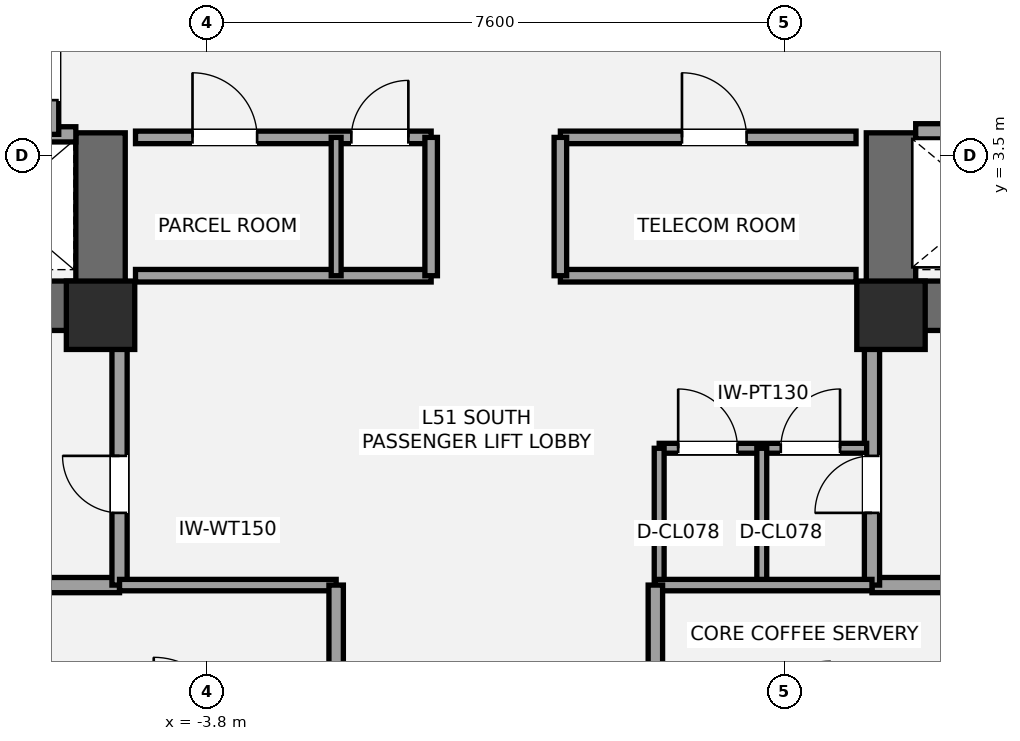
"""IFC4 building model, lengths in metres.
Left out: names, types, materials, properties, quantities, classifications, styles, units other than length and angle.
Written with IfcOpenShell. Run it as: python <this file> out.ifc"""

import sys

from ifc_helpers import new_model, si_unit, direction, frame, frame_2d, origin, origin_2d, place, context, subcontext, project, spatial, rectangle, extrude, element, fill, save


model = new_model("IFC4")
c1 = context("Model", 3, precision=1e-05, world=origin(), true_north=direction((0.0, 1.0)))
c2 = subcontext(c1, "Body", "Model", "MODEL_VIEW")
j1 = project(units=[si_unit("LENGTHUNIT", "METRE"), si_unit("PLANEANGLEUNIT", "RADIAN")], contexts=[c1])
p1 = place(None, origin())
s1 = spatial("IfcSite", under=j1, at=p1, CompositionType="ELEMENT")
p2 = place(p1, origin())
s2 = spatial("IfcBuilding", under=s1, at=p2, CompositionType="ELEMENT")
p3 = place(p2, frame((0.0, 0.0, 185.4)))
s3 = spatial("IfcBuildingStorey", under=s2, at=p3, CompositionType="ELEMENT", Elevation=185.4)
p4 = place(p3, frame((-4.875, 1.525, 0.0), z_axis=(0.0, 0.0, 1.0), x_axis=(-1.0, 0.0, 0.0)))
e1 = element("IfcWall", 1, at=p4, inside=s3, PredefinedType="SHEAR", context=c2, shape_type="SweptSolid", body=[
    extrude(rectangle(XDim=8.925, YDim=0.65, at=frame_2d((4.462, 0.0))), origin(), (0.0, 0.0, 1.0), 3.2),
])
p5 = place(p4, frame((5.425, 0.0, 0.0)))
e2 = element("IfcOpeningElement", 2, at=p5, cuts=e1, PredefinedType="OPENING", context=c2, shape_type="SweptSolid", body=[
    extrude(rectangle(XDim=1.05, YDim=2.15, at=frame_2d((0.525, 1.075))), frame((0.0, 0.335, 0.0), z_axis=(0.0, -1.0, 0.0), x_axis=(1.0, 0.0, 0.0)), (0.0, 0.0, 1.0), 0.67),
])
p6 = place(p4, frame((3.755, 0.0, 0.0)))
e3 = element("IfcOpeningElement", 3, at=p6, cuts=e1, PredefinedType="OPENING", context=c2, shape_type="SweptSolid", body=[
    extrude(rectangle(XDim=1.1, YDim=2.2, at=frame_2d((0.55, 1.1))), frame((0.0, 0.335, 0.0), z_axis=(0.0, -1.0, 0.0), x_axis=(1.0, 0.0, 0.0)), (0.0, 0.0, 1.0), 0.67),
])
p7 = place(p3, frame((-5.2, 1.2, 0.0), z_axis=(0.0, 0.0, 1.0), x_axis=(0.0, 1.0, 0.0)))
e4 = element("IfcWall", 4, at=p7, inside=s3, PredefinedType="SHEAR", context=c2, shape_type="SweptSolid", body=[
    extrude(rectangle(XDim=2.6, YDim=0.65, at=frame_2d((1.3, 0.0))), origin(), (0.0, 0.0, 1.0), 3.2),
])
p8 = place(p3, frame((13.8, 1.525, 0.0), z_axis=(0.0, 0.0, 1.0), x_axis=(-1.0, 0.0, 0.0)))
e5 = element("IfcWall", 5, at=p8, inside=s3, PredefinedType="SHEAR", context=c2, shape_type="SweptSolid", body=[
    extrude(rectangle(XDim=8.925, YDim=0.65, at=frame_2d((4.462, 0.0))), origin(), (0.0, 0.0, 1.0), 3.2),
])
p9 = place(p8, frame((2.45, 0.0, 0.0)))
e6 = element("IfcOpeningElement", 6, at=p9, cuts=e5, PredefinedType="OPENING", context=c2, shape_type="SweptSolid", body=[
    extrude(rectangle(XDim=1.05, YDim=2.15, at=frame_2d((0.525, 1.075))), frame((0.0, 0.335, 0.0), z_axis=(0.0, -1.0, 0.0), x_axis=(1.0, 0.0, 0.0)), (0.0, 0.0, 1.0), 0.67),
])
p10 = place(p8, frame((4.45, 0.0, 0.0)))
e7 = element("IfcOpeningElement", 7, at=p10, cuts=e5, PredefinedType="OPENING", context=c2, shape_type="SweptSolid", body=[
    extrude(rectangle(XDim=1.1, YDim=2.2, at=frame_2d((0.55, 1.1))), frame((0.0, 0.335, 0.0), z_axis=(0.0, -1.0, 0.0), x_axis=(1.0, 0.0, 0.0)), (0.0, 0.0, 1.0), 0.67),
])
p11 = place(p3, frame((5.2, 1.2, 0.0), z_axis=(0.0, 0.0, 1.0), x_axis=(0.0, 1.0, 0.0)))
e8 = element("IfcWall", 8, at=p11, inside=s3, PredefinedType="SHEAR", context=c2, shape_type="SweptSolid", body=[
    extrude(rectangle(XDim=2.6, YDim=0.65, at=frame_2d((1.3, 0.0))), origin(), (0.0, 0.0, 1.0), 3.2),
])
for number, where, z_axis, x_axis in (
    (9, (-5.2, 1.4, 0.0), (0.0, 0.0, 1.0), (1.0, 0.0, 0.0)),
    (10, (5.2, 1.4, 0.0), (0.0, 0.0, 1.0), (1.0, 0.0, 0.0)),
):
    element("IfcColumn", number, at=place(p3, frame(where, z_axis=z_axis, x_axis=x_axis)), inside=s3, PredefinedType="COLUMN", context=c2, shape_type="SweptSolid", body=[
        extrude(rectangle(XDim=0.9, YDim=0.9, at=origin_2d()), origin(), (0.0, 0.0, 1.0), 3.2),
    ])
p12 = place(p3, frame((-7.2, -2.15, 0.0), z_axis=(0.0, 0.0, 1.0), x_axis=(1.0, 0.0, 0.0)))
e11 = element("IfcWall", 11, at=p12, inside=s3, PredefinedType="SOLIDWALL", context=c2, shape_type="SweptSolid", body=[
    extrude(rectangle(XDim=2.25, YDim=0.2, at=frame_2d((1.125, 0.0))), origin(), (0.0, 0.0, 1.0), 3.02),
])
p13 = place(p3, frame((-4.95, -2.15, 0.0), z_axis=(0.0, 0.0, 1.0), x_axis=(0.0, 1.0, 0.0)))
e12 = element("IfcWall", 12, at=p13, inside=s3, PredefinedType="SOLIDWALL", context=c2, shape_type="SweptSolid", body=[
    extrude(rectangle(XDim=3.4, YDim=0.2, at=frame_2d((1.7, 0.0))), origin(), (0.0, 0.0, 1.0), 2.473),
])
p14 = place(p13, frame((0.95, 0.0, 0.0)))
e13 = element("IfcOpeningElement", 13, at=p14, cuts=e12, PredefinedType="OPENING", context=c2, shape_type="SweptSolid", body=[
    extrude(rectangle(XDim=0.75, YDim=2.1, at=frame_2d((0.375, 1.05))), frame((0.0, 0.11, 0.0), z_axis=(0.0, -1.0, 0.0), x_axis=(1.0, 0.0, 0.0)), (0.0, 0.0, 1.0), 0.22),
])
p15 = place(p3, frame((4.95, -2.15, 0.0), z_axis=(0.0, 0.0, 1.0), x_axis=(1.0, 0.0, 0.0)))
e14 = element("IfcWall", 14, at=p15, inside=s3, PredefinedType="SOLIDWALL", context=c2, shape_type="SweptSolid", body=[
    extrude(rectangle(XDim=2.25, YDim=0.2, at=frame_2d((1.125, 0.0))), origin(), (0.0, 0.0, 1.0), 3.02),
])
p16 = place(p3, frame((4.95, -2.15, 0.0), z_axis=(0.0, 0.0, 1.0), x_axis=(0.0, 1.0, 0.0)))
e15 = element("IfcWall", 15, at=p16, inside=s3, PredefinedType="SOLIDWALL", context=c2, shape_type="SweptSolid", body=[
    extrude(rectangle(XDim=3.4, YDim=0.2, at=frame_2d((1.7, 0.0))), origin(), (0.0, 0.0, 1.0), 2.473),
])
p17 = place(p16, frame((0.95, 0.0, 0.0)))
e16 = element("IfcOpeningElement", 16, at=p17, cuts=e15, PredefinedType="OPENING", context=c2, shape_type="SweptSolid", body=[
    extrude(rectangle(XDim=0.75, YDim=2.1, at=frame_2d((0.375, 1.05))), frame((0.0, 0.11, 0.0), z_axis=(0.0, -1.0, 0.0), x_axis=(1.0, 0.0, 0.0)), (0.0, 0.0, 1.0), 0.22),
])
p18 = place(p3, frame((2.15, -0.35, 0.0), z_axis=(0.0, 0.0, 1.0), x_axis=(1.0, 0.0, 0.0)))
e17 = element("IfcWall", 17, at=p18, inside=s3, PredefinedType="PARTITIONING", context=c2, shape_type="SweptSolid", body=[
    extrude(rectangle(XDim=2.73, YDim=0.13, at=frame_2d((1.365, 0.0))), origin(), (0.0, 0.0, 1.0), 3.02),
])
p19 = place(p18, frame((0.25, 0.0, 0.0)))
e18 = element("IfcOpeningElement", 18, at=p19, cuts=e17, PredefinedType="OPENING", context=c2, shape_type="SweptSolid", body=[
    extrude(rectangle(XDim=0.78, YDim=2.1, at=frame_2d((0.39, 1.05))), frame((0.0, 0.075, 0.0), z_axis=(0.0, -1.0, 0.0), x_axis=(1.0, 0.0, 0.0)), (0.0, 0.0, 1.0), 0.15),
])
p20 = place(p18, frame((1.6, 0.0, 0.0)))
e19 = element("IfcOpeningElement", 19, at=p20, cuts=e17, PredefinedType="OPENING", context=c2, shape_type="SweptSolid", body=[
    extrude(rectangle(XDim=0.78, YDim=2.1, at=frame_2d((0.39, 1.05))), frame((0.0, 0.075, 0.0), z_axis=(0.0, -1.0, 0.0), x_axis=(1.0, 0.0, 0.0)), (0.0, 0.0, 1.0), 0.15),
])
for number, where, z_axis, x_axis in (
    (20, (2.15, -2.15, 0.0), (0.0, 0.0, 1.0), (0.0, 1.0, 0.0)),
    (21, (3.5, -2.15, 0.0), (0.0, 0.0, 1.0), (0.0, 1.0, 0.0)),
):
    element("IfcWall", number, at=place(p3, frame(where, z_axis=z_axis, x_axis=x_axis)), inside=s3, PredefinedType="PARTITIONING", context=c2, shape_type="SweptSolid", body=[
        extrude(rectangle(XDim=1.8, YDim=0.13, at=frame_2d((0.9, 0.0))), origin(), (0.0, 0.0, 1.0), 3.02),
    ])
p21 = place(p3, frame((-9.78, 3.78, 0.0), z_axis=(0.0, 0.0, 1.0), x_axis=(1.0, 0.0, 0.0)))
e22 = element("IfcWall", 22, at=p21, inside=s3, PredefinedType="SOLIDWALL", context=c2, shape_type="SweptSolid", body=[
    extrude(rectangle(XDim=4.255, YDim=0.2, at=frame_2d((2.127, 0.0))), origin(), (0.0, 0.0, 1.0), 3.02),
])
p22 = place(p3, frame((-5.85, 3.78, 0.0), z_axis=(0.0, 0.0, 1.0), x_axis=(0.0, 1.0, 0.0)))
e23 = element("IfcWall", 23, at=p22, inside=s3, PredefinedType="SOLIDWALL", context=c2, shape_type="SweptSolid", body=[
    extrude(rectangle(XDim=1.69, YDim=0.2, at=frame_2d((0.845, 0.0))), origin(), (0.0, 0.0, 1.0), 3.02),
])
p23 = place(p22, frame((0.45, 0.0, 0.0)))
e24 = element("IfcOpeningElement", 24, at=p23, cuts=e23, PredefinedType="OPENING", context=c2, shape_type="SweptSolid", body=[
    extrude(rectangle(XDim=0.75, YDim=2.1, at=frame_2d((0.375, 1.05))), frame((0.0, 0.11, 0.0), z_axis=(0.0, -1.0, 0.0), x_axis=(1.0, 0.0, 0.0)), (0.0, 0.0, 1.0), 0.22),
])
p24 = place(p3, frame((5.525, 3.82, 0.0), z_axis=(0.0, 0.0, 1.0), x_axis=(1.0, 0.0, 0.0)))
e25 = element("IfcWall", 25, at=p24, inside=s3, PredefinedType="SOLIDWALL", context=c2, shape_type="SweptSolid", body=[
    extrude(rectangle(XDim=4.255, YDim=0.2, at=frame_2d((2.127, 0.0))), origin(), (0.0, 0.0, 1.0), 3.02),
])
p25 = place(p24, frame((0.65, 0.0, 0.0)))
e26 = element("IfcOpeningElement", 26, at=p25, cuts=e25, PredefinedType="OPENING", context=c2, shape_type="SweptSolid", body=[
    extrude(rectangle(XDim=1.2, YDim=2.2, at=frame_2d((0.6, 1.1))), frame((0.0, 0.11, 0.0), z_axis=(0.0, -1.0, 0.0), x_axis=(1.0, 0.0, 0.0)), (0.0, 0.0, 1.0), 0.22),
])
p26 = place(p3, frame((-4.74, 1.92, 0.0), z_axis=(0.0, 0.0, 1.0), x_axis=(1.0, 0.0, 0.0)))
e27 = element("IfcWall", 27, at=p26, inside=s3, PredefinedType="PARTITIONING", context=c2, shape_type="SweptSolid", body=[
    extrude(rectangle(XDim=3.89, YDim=0.165, at=frame_2d((1.945, 0.0))), origin(), (0.0, 0.0, 1.0), 2.16),
])
p27 = place(p3, frame((-4.74, 3.74, 0.0), z_axis=(0.0, 0.0, 1.0), x_axis=(1.0, 0.0, 0.0)))
e28 = element("IfcWall", 28, at=p27, inside=s3, PredefinedType="PARTITIONING", context=c2, shape_type="SweptSolid", body=[
    extrude(rectangle(XDim=3.89, YDim=0.165, at=frame_2d((1.945, 0.0))), origin(), (0.0, 0.0, 1.0), 3.02),
])
p28 = place(p27, frame((0.75, 0.0, 0.0)))
e29 = element("IfcOpeningElement", 29, at=p28, cuts=e28, PredefinedType="OPENING", context=c2, shape_type="SweptSolid", body=[
    extrude(rectangle(XDim=0.85, YDim=2.1, at=frame_2d((0.425, 1.05))), frame((0.0, 0.093, 0.0), z_axis=(0.0, -1.0, 0.0), x_axis=(1.0, 0.0, 0.0)), (0.0, 0.0, 1.0), 0.185),
])
p29 = place(p27, frame((2.84, 0.0, 0.0)))
e30 = element("IfcOpeningElement", 30, at=p29, cuts=e28, PredefinedType="OPENING", context=c2, shape_type="SweptSolid", body=[
    extrude(rectangle(XDim=0.75, YDim=2.1, at=frame_2d((0.375, 1.05))), frame((0.0, 0.093, 0.0), z_axis=(0.0, -1.0, 0.0), x_axis=(1.0, 0.0, 0.0)), (0.0, 0.0, 1.0), 0.185),
])
p30 = place(p3, frame((-0.85, 1.92, 0.0), z_axis=(0.0, 0.0, 1.0), x_axis=(0.0, 1.0, 0.0)))
e31 = element("IfcWall", 31, at=p30, inside=s3, PredefinedType="PARTITIONING", context=c2, shape_type="SweptSolid", body=[
    extrude(rectangle(XDim=1.82, YDim=0.165, at=frame_2d((0.91, 0.0))), origin(), (0.0, 0.0, 1.0), 3.02),
])
p31 = place(p3, frame((0.85, 1.92, 0.0), z_axis=(0.0, 0.0, 1.0), x_axis=(1.0, 0.0, 0.0)))
e32 = element("IfcWall", 32, at=p31, inside=s3, PredefinedType="PARTITIONING", context=c2, shape_type="SweptSolid", body=[
    extrude(rectangle(XDim=3.89, YDim=0.165, at=frame_2d((1.945, 0.0))), origin(), (0.0, 0.0, 1.0), 2.16),
])
p32 = place(p3, frame((0.85, 3.74, 0.0), z_axis=(0.0, 0.0, 1.0), x_axis=(1.0, 0.0, 0.0)))
e33 = element("IfcWall", 33, at=p32, inside=s3, PredefinedType="PARTITIONING", context=c2, shape_type="SweptSolid", body=[
    extrude(rectangle(XDim=3.89, YDim=0.165, at=frame_2d((1.945, 0.0))), origin(), (0.0, 0.0, 1.0), 3.02),
])
p33 = place(p32, frame((1.6, 0.0, 0.0)))
e34 = element("IfcOpeningElement", 34, at=p33, cuts=e33, PredefinedType="OPENING", context=c2, shape_type="SweptSolid", body=[
    extrude(rectangle(XDim=0.85, YDim=2.1, at=frame_2d((0.425, 1.05))), frame((0.0, 0.093, 0.0), z_axis=(0.0, -1.0, 0.0), x_axis=(1.0, 0.0, 0.0)), (0.0, 0.0, 1.0), 0.185),
])
p34 = place(p3, frame((0.85, 1.92, 0.0), z_axis=(0.0, 0.0, 1.0), x_axis=(0.0, 1.0, 0.0)))
e35 = element("IfcWall", 35, at=p34, inside=s3, PredefinedType="PARTITIONING", context=c2, shape_type="SweptSolid", body=[
    extrude(rectangle(XDim=1.82, YDim=0.165, at=frame_2d((0.91, 0.0))), origin(), (0.0, 0.0, 1.0), 3.02),
])
p35 = place(p3, frame((-2.1, 1.92, 0.0), z_axis=(0.0, 0.0, 1.0), x_axis=(0.0, 1.0, 0.0)))
e36 = element("IfcWall", 36, at=p35, inside=s3, PredefinedType="PARTITIONING", context=c2, shape_type="SweptSolid", body=[
    extrude(rectangle(XDim=1.82, YDim=0.13, at=frame_2d((0.91, 0.0))), origin(), (0.0, 0.0, 1.0), 3.02),
])
p36 = place(p3, frame((-4.95, -2.15, 0.0), z_axis=(0.0, 0.0, 1.0), x_axis=(1.0, 0.0, 0.0)))
e37 = element("IfcWall", 37, at=p36, inside=s3, PredefinedType="PLUMBINGWALL", context=c2, shape_type="SweptSolid", body=[
    extrude(rectangle(XDim=2.85, YDim=0.15, at=frame_2d((1.425, 0.0))), origin(), (0.0, 0.0, 1.0), 2.473),
])
p37 = place(p3, frame((-2.1, -4.05, 0.0), z_axis=(0.0, 0.0, 1.0), x_axis=(0.0, 1.0, 0.0)))
e38 = element("IfcWall", 38, at=p37, inside=s3, PredefinedType="PLUMBINGWALL", context=c2, shape_type="SweptSolid", body=[
    extrude(rectangle(XDim=1.9, YDim=0.19, at=frame_2d((0.95, 0.0))), origin(), (0.0, 0.0, 1.0), 3.02),
])
p38 = place(p3, frame((2.1, -2.15, 0.0), z_axis=(0.0, 0.0, 1.0), x_axis=(1.0, 0.0, 0.0)))
e39 = element("IfcWall", 39, at=p38, inside=s3, PredefinedType="PLUMBINGWALL", context=c2, shape_type="SweptSolid", body=[
    extrude(rectangle(XDim=2.85, YDim=0.15, at=frame_2d((1.425, 0.0))), origin(), (0.0, 0.0, 1.0), 3.02),
])
p39 = place(p3, frame((2.1, -4.05, 0.0), z_axis=(0.0, 0.0, 1.0), x_axis=(0.0, 1.0, 0.0)))
e40 = element("IfcWall", 40, at=p39, inside=s3, PredefinedType="PLUMBINGWALL", context=c2, shape_type="SweptSolid", body=[
    extrude(rectangle(XDim=1.9, YDim=0.19, at=frame_2d((0.95, 0.0))), origin(), (0.0, 0.0, 1.0), 3.02),
])
p40 = place(p14, origin())
e41 = element("IfcDoor", 41, at=p40, inside=s3, OperationType="SINGLE_SWING_RIGHT", PredefinedType="DOOR", context=c2, shape_type="SweptSolid", body=[
    extrude(rectangle(XDim=0.75, YDim=2.1, at=frame_2d((0.375, 1.05))), frame((0.0, 0.025, 0.0), z_axis=(0.0, -1.0, 0.0), x_axis=(1.0, 0.0, 0.0)), (0.0, 0.0, 1.0), 0.05),
])
fill(e13, e41)
p41 = place(p17, origin())
e42 = element("IfcDoor", 42, at=p41, inside=s3, OperationType="SINGLE_SWING_LEFT", PredefinedType="DOOR", context=c2, shape_type="SweptSolid", body=[
    extrude(rectangle(XDim=0.75, YDim=2.1, at=frame_2d((0.375, 1.05))), frame((0.0, 0.025, 0.0), z_axis=(0.0, -1.0, 0.0), x_axis=(1.0, 0.0, 0.0)), (0.0, 0.0, 1.0), 0.05),
])
fill(e16, e42)
p42 = place(p19, origin())
e43 = element("IfcDoor", 43, at=p42, inside=s3, OperationType="SINGLE_SWING_LEFT", PredefinedType="DOOR", context=c2, shape_type="SweptSolid", body=[
    extrude(rectangle(XDim=0.78, YDim=2.1, at=frame_2d((0.39, 1.05))), frame((0.0, 0.025, 0.0), z_axis=(0.0, -1.0, 0.0), x_axis=(1.0, 0.0, 0.0)), (0.0, 0.0, 1.0), 0.05),
])
fill(e18, e43)
p43 = place(p20, origin())
e44 = element("IfcDoor", 44, at=p43, inside=s3, OperationType="SINGLE_SWING_RIGHT", PredefinedType="DOOR", context=c2, shape_type="SweptSolid", body=[
    extrude(rectangle(XDim=0.78, YDim=2.1, at=frame_2d((0.39, 1.05))), frame((0.0, 0.025, 0.0), z_axis=(0.0, -1.0, 0.0), x_axis=(1.0, 0.0, 0.0)), (0.0, 0.0, 1.0), 0.05),
])
fill(e19, e44)
p44 = place(p23, origin())
e45 = element("IfcDoor", 45, at=p44, inside=s3, OperationType="SINGLE_SWING_RIGHT", PredefinedType="DOOR", context=c2, shape_type="SweptSolid", body=[
    extrude(rectangle(XDim=0.75, YDim=2.1, at=frame_2d((0.375, 1.05))), frame((0.0, 0.025, 0.0), z_axis=(0.0, -1.0, 0.0), x_axis=(1.0, 0.0, 0.0)), (0.0, 0.0, 1.0), 0.05),
])
fill(e24, e45)
p45 = place(p28, origin())
e46 = element("IfcDoor", 46, at=p45, inside=s3, OperationType="SINGLE_SWING_LEFT", PredefinedType="DOOR", context=c2, shape_type="SweptSolid", body=[
    extrude(rectangle(XDim=0.85, YDim=2.1, at=frame_2d((0.425, 1.05))), frame((0.0, 0.025, 0.0), z_axis=(0.0, -1.0, 0.0), x_axis=(1.0, 0.0, 0.0)), (0.0, 0.0, 1.0), 0.05),
])
fill(e29, e46)
p46 = place(p29, origin())
e47 = element("IfcDoor", 47, at=p46, inside=s3, OperationType="SINGLE_SWING_RIGHT", PredefinedType="DOOR", context=c2, shape_type="SweptSolid", body=[
    extrude(rectangle(XDim=0.75, YDim=2.1, at=frame_2d((0.375, 1.05))), frame((0.0, 0.025, 0.0), z_axis=(0.0, -1.0, 0.0), x_axis=(1.0, 0.0, 0.0)), (0.0, 0.0, 1.0), 0.05),
])
fill(e30, e47)
p47 = place(p33, origin())
e48 = element("IfcDoor", 48, at=p47, inside=s3, OperationType="SINGLE_SWING_LEFT", PredefinedType="DOOR", context=c2, shape_type="SweptSolid", body=[
    extrude(rectangle(XDim=0.85, YDim=2.1, at=frame_2d((0.425, 1.05))), frame((0.0, 0.025, 0.0), z_axis=(0.0, -1.0, 0.0), x_axis=(1.0, 0.0, 0.0)), (0.0, 0.0, 1.0), 0.05),
])
fill(e34, e48)
save(model, sys.argv[1])
